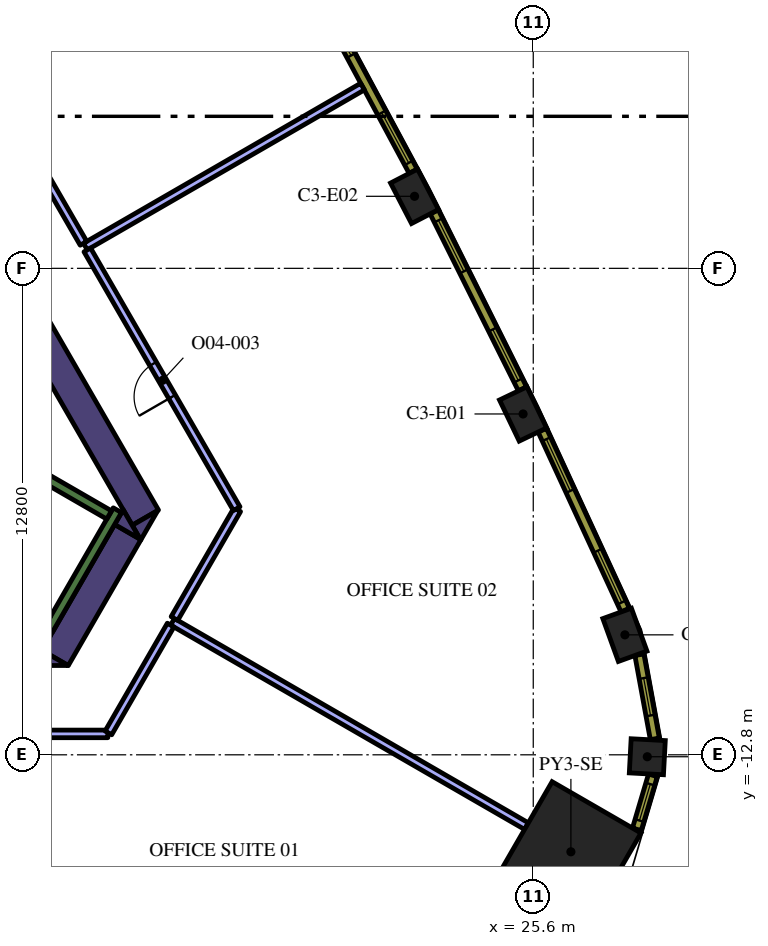
"""IFC4 building model, lengths in metres.
Left out: names, types, materials, properties, quantities, classifications, styles, units other than length and angle.
Written with IfcOpenShell. Run it as: python <this file> out.ifc"""

import sys

from ifc_helpers import new_model, si_unit, direction, frame, frame_2d, origin, origin_2d, place, context, subcontext, project, spatial, polyline, rectangle, outline, extrude, element, fill, save


model = new_model("IFC4")
c1 = context("Model", 3, precision=1e-05, world=origin(), true_north=direction((0.0, 1.0)))
c2 = subcontext(c1, "Body", "Model", "MODEL_VIEW")
j1 = project(units=[si_unit("LENGTHUNIT", "METRE"), si_unit("PLANEANGLEUNIT", "RADIAN")], contexts=[c1])
p1 = place(None, origin())
s1 = spatial("IfcSite", under=j1, at=p1, CompositionType="ELEMENT")
p2 = place(p1, origin())
s2 = spatial("IfcBuilding", under=s1, at=p2, CompositionType="ELEMENT")
p3 = place(p2, frame((0.0, 0.0, 183.6)))
s3 = spatial("IfcBuildingStorey", under=s2, at=p3, CompositionType="ELEMENT", Elevation=183.6)
p4 = place(p3, frame((26.591, -15.352, 0.0), z_axis=(0.0, 0.0, 1.0), x_axis=(0.866025403784, -0.5, 0.0)))
e1 = element("IfcColumn", 1, at=p4, inside=s3, PredefinedType="COLUMN", context=c2, shape_type="SweptSolid", body=[
    extrude(rectangle(XDim=2.7, YDim=2.7, at=origin_2d()), origin(), (0.0, 0.0, 1.0), 4.2),
])
p5 = place(p3, frame((28.601, -12.851, 0.0), z_axis=(0.0, 0.0, 1.0), x_axis=(0.0533921468, 0.998573622053, 0.0)))
e2 = element("IfcColumn", 2, at=p5, inside=s3, PredefinedType="COLUMN", context=c2, shape_type="SweptSolid", body=[
    extrude(rectangle(XDim=0.9, YDim=0.9, at=origin_2d()), origin(), (0.0, 0.0, 1.0), 4.2),
])
for number, where, z_axis, x_axis in (
    (3, (28.012, -9.644, 0.0), (0.0, 0.0, 1.0), (-0.341, 0.94, 0.0)),
    (4, (25.332, -3.832, 0.0), (0.0, 0.0, 1.0), (-0.433, 0.902, 0.0)),
    (5, (22.476, 1.896, 0.0), (0.0, 0.0, 1.0), (-0.46, 0.888, 0.0)),
):
    element("IfcColumn", number, at=place(p3, frame(where, z_axis=z_axis, x_axis=x_axis)), inside=s3, PredefinedType="COLUMN", context=c2, shape_type="SweptSolid", body=[
        extrude(rectangle(XDim=1.2, YDim=0.8, at=origin_2d()), origin(), (0.0, 0.0, 1.0), 4.2),
    ])
p6 = place(p3, frame((9.129, 4.289, 0.0), z_axis=(0.0, 0.0, 1.0), x_axis=(0.499995742806, -0.866027861663, 0.0)))
e6 = element("IfcWall", 6, at=p6, inside=s3, PredefinedType="SOLIDWALL", context=c2, shape_type="SweptSolid", body=[
    extrude(rectangle(XDim=12.527, YDim=0.8, at=frame_2d((6.264, 0.0))), origin(), (0.0, 0.0, 1.0), 4.2),
])
p7 = place(p3, origin())
e7 = element("IfcWall", 7, at=p7, inside=s3, PredefinedType="SOLIDWALL", context=c2, shape_type="SweptSolid", body=[
    extrude(outline(polyline([(15.271, -7.15), (15.047, -6.762), (15.719, -6.374), (15.271, -7.15)])), origin(), (0.0, 0.0, 1.0), 4.2),
])
p8 = place(p3, frame((13.018, -10.252, 0.0), z_axis=(0.0, 0.0, 1.0), x_axis=(0.499984020225, 0.866034629516, 0.0)))
e8 = element("IfcWall", 8, at=p8, inside=s3, PredefinedType="SOLIDWALL", context=c2, shape_type="SweptSolid", body=[
    extrude(rectangle(XDim=3.824, YDim=0.8, at=frame_2d((1.912, 0.0))), origin(), (0.0, 0.0, 1.0), 4.2),
])
e9 = element("IfcWall", 9, at=p7, inside=s3, PredefinedType="SOLIDWALL", context=c2, shape_type="SweptSolid", body=[
    extrude(outline(polyline([(12.671, -10.053), (13.358, -10.45), (12.442, -10.45), (12.671, -10.053)])), origin(), (0.0, 0.0, 1.0), 4.2),
])
e10 = element("IfcWall", 10, at=p7, inside=s3, PredefinedType="SOLIDWALL", context=c2, shape_type="SweptSolid", body=[
    extrude(outline(polyline([(14.809, -6.35), (15.257, -7.126), (14.585, -6.738), (14.809, -6.35)])), origin(), (0.0, 0.0, 1.0), 4.2),
])
p9 = place(p3, frame((12.84, -9.511, 0.0), z_axis=(0.0, 0.0, 1.0), x_axis=(0.499997733992, 0.866026712061, 0.0)))
e11 = element("IfcWall", 11, at=p9, inside=s3, PredefinedType="SOLIDWALL", context=c2, shape_type="SweptSolid", body=[
    extrude(rectangle(XDim=3.634, YDim=0.25, at=frame_2d((1.817, 0.0))), origin(), (0.0, 0.0, 1.0), 4.2),
])
p10 = place(p3, frame((8.334, -2.964, 0.0), z_axis=(0.0, 0.0, 1.0), x_axis=(0.866016039709, -0.500016218704, 0.0)))
e12 = element("IfcWall", 12, at=p10, inside=s3, PredefinedType="SOLIDWALL", context=c2, shape_type="SweptSolid", body=[
    extrude(rectangle(XDim=7.05, YDim=0.25, at=frame_2d((3.525, 0.0))), origin(), (0.0, 0.0, 1.0), 4.2),
])
p11 = place(p3, frame((16.108, -9.3, 0.0), z_axis=(0.0, 0.0, 1.0), x_axis=(0.866027180319, -0.499996922939, 0.0)))
e13 = element("IfcWall", 13, at=p11, inside=s3, PredefinedType="PARTITIONING", context=c2, shape_type="SweptSolid", body=[
    extrude(rectangle(XDim=10.754, YDim=0.2, at=frame_2d((5.377, 0.0))), origin(), (0.0, 0.0, 1.0), 3.15),
])
p12 = place(p3, frame((9.717, -12.25, 0.0), z_axis=(0.0, 0.0, 1.0), x_axis=(1.0, 0.0, 0.0)))
e14 = element("IfcWall", 14, at=p12, inside=s3, PredefinedType="PARTITIONING", context=c2, shape_type="SweptSolid", body=[
    extrude(rectangle(XDim=4.688, YDim=0.2, at=frame_2d((2.344, 0.0))), origin(), (0.0, 0.0, 1.0), 3.15),
])
p13 = place(p12, frame((1.8, 0.0, 0.0)))
e15 = element("IfcOpeningElement", 15, at=p13, cuts=e14, PredefinedType="OPENING", context=c2, shape_type="SweptSolid", body=[
    extrude(rectangle(XDim=1.0, YDim=2.1, at=frame_2d((0.5, 1.05))), frame((0.0, 0.11, 0.0), z_axis=(0.0, -1.0, 0.0), x_axis=(1.0, 0.0, 0.0)), (0.0, 0.0, 1.0), 0.22),
])
p14 = place(p3, frame((14.42, -12.224, 0.0), z_axis=(0.0, 0.0, 1.0), x_axis=(0.500001965626, 0.866024268927, 0.0)))
e16 = element("IfcWall", 16, at=p14, inside=s3, PredefinedType="PARTITIONING", context=c2, shape_type="SweptSolid", body=[
    extrude(rectangle(XDim=3.276, YDim=0.2, at=frame_2d((1.638, 0.0))), origin(), (0.0, 0.0, 1.0), 3.15),
])
p15 = place(p3, frame((13.815, 0.572, 0.0), z_axis=(0.0, 0.0, 1.0), x_axis=(0.866036391575, 0.499980968105, 0.0)))
e17 = element("IfcWall", 17, at=p15, inside=s3, PredefinedType="PARTITIONING", context=c2, shape_type="SweptSolid", body=[
    extrude(rectangle(XDim=8.42, YDim=0.2, at=frame_2d((4.21, 0.0))), origin(), (0.0, 0.0, 1.0), 3.15),
])
p16 = place(p3, frame((16.158, -9.213, 0.0), z_axis=(0.0, 0.0, 1.0), x_axis=(0.499990919662, 0.866030646256, 0.0)))
e18 = element("IfcWall", 18, at=p16, inside=s3, PredefinedType="PARTITIONING", context=c2, shape_type="SweptSolid", body=[
    extrude(rectangle(XDim=3.306, YDim=0.2, at=frame_2d((1.653, 0.0))), origin(), (0.0, 0.0, 1.0), 3.15),
])
p17 = place(p3, frame((17.796, -6.324, 0.0), z_axis=(0.0, 0.0, 1.0), x_axis=(-0.500026166427, 0.866010296064, 0.0)))
e19 = element("IfcWall", 19, at=p17, inside=s3, PredefinedType="PARTITIONING", context=c2, shape_type="SweptSolid", body=[
    extrude(rectangle(XDim=7.863, YDim=0.2, at=frame_2d((3.931, 0.0))), origin(), (0.0, 0.0, 1.0), 3.15),
])
p18 = place(p17, frame((3.4, 0.0, 0.0)))
e20 = element("IfcOpeningElement", 20, at=p18, cuts=e19, PredefinedType="OPENING", context=c2, shape_type="SweptSolid", body=[
    extrude(rectangle(XDim=1.0, YDim=2.1, at=frame_2d((0.5, 1.05))), frame((0.0, 0.11, 0.0), z_axis=(0.0, -1.0, 0.0), x_axis=(1.0, 0.0, 0.0)), (0.0, 0.0, 1.0), 0.22),
])
p19 = place(p3, frame((13.765, 0.659, 0.0), z_axis=(0.0, 0.0, 1.0), x_axis=(-0.500046568876, 0.865998515562, 0.0)))
e21 = element("IfcWall", 21, at=p19, inside=s3, PredefinedType="PARTITIONING", context=c2, shape_type="SweptSolid", body=[
    extrude(rectangle(XDim=2.782, YDim=0.2, at=frame_2d((1.391, 0.0))), origin(), (0.0, 0.0, 1.0), 3.15),
])
p20 = place(p3, frame((28.326, -14.76, 0.0), z_axis=(0.0, 0.0, 1.0), x_axis=(0.284413721403, 0.958701640281, 0.0)))
e22 = element("IfcWall", 22, at=p20, inside=s3, PredefinedType="SOLIDWALL", context=c2, shape_type="SweptSolid", body=[
    extrude(rectangle(XDim=1.482, YDim=0.24, at=frame_2d((0.741, 0.0))), origin(), (0.0, 0.0, 1.0), 3.95),
])
p21 = place(p20, frame((0.241, 0.0, 0.9)))
e23 = element("IfcOpeningElement", 23, at=p21, cuts=e22, PredefinedType="OPENING", context=c2, shape_type="SweptSolid", body=[
    extrude(rectangle(XDim=1.0, YDim=2.55, at=frame_2d((0.5, 1.275))), frame((0.0, 0.13, 0.0), z_axis=(0.0, -1.0, 0.0), x_axis=(1.0, 0.0, 0.0)), (0.0, 0.0, 1.0), 0.26),
])
p22 = place(p3, frame((28.799, -12.38, 0.0), z_axis=(0.0, 0.0, 1.0), x_axis=(-0.180737189259, 0.983531427265, 0.0)))
e24 = element("IfcWall", 24, at=p22, inside=s3, PredefinedType="SOLIDWALL", context=c2, shape_type="SweptSolid", body=[
    extrude(rectangle(XDim=2.25, YDim=0.24, at=frame_2d((1.125, 0.0))), origin(), (0.0, 0.0, 1.0), 3.95),
])
p23 = place(p22, frame((0.625, 0.0, 0.9)))
e25 = element("IfcOpeningElement", 25, at=p23, cuts=e24, PredefinedType="OPENING", context=c2, shape_type="SweptSolid", body=[
    extrude(rectangle(XDim=1.0, YDim=2.55, at=frame_2d((0.5, 1.275))), frame((0.0, 0.13, 0.0), z_axis=(0.0, -1.0, 0.0), x_axis=(1.0, 0.0, 0.0)), (0.0, 0.0, 1.0), 0.26),
])
p24 = place(p3, frame((28.02, -8.992, 0.0), z_axis=(0.0, 0.0, 1.0), x_axis=(-0.418722559465, 0.908114209885, 0.0)))
e26 = element("IfcWall", 26, at=p24, inside=s3, PredefinedType="SOLIDWALL", context=c2, shape_type="SweptSolid", body=[
    extrude(rectangle(XDim=5.213, YDim=0.24, at=frame_2d((2.606, 0.0))), origin(), (0.0, 0.0, 1.0), 3.95),
])
p25 = place(p24, frame((0.221, 0.0, 0.9)))
e27 = element("IfcOpeningElement", 27, at=p25, cuts=e26, PredefinedType="OPENING", context=c2, shape_type="SweptSolid", body=[
    extrude(rectangle(XDim=1.5, YDim=2.55, at=frame_2d((0.75, 1.275))), frame((0.0, 0.13, 0.0), z_axis=(0.0, -1.0, 0.0), x_axis=(1.0, 0.0, 0.0)), (0.0, 0.0, 1.0), 0.26),
])
p26 = place(p24, frame((3.452, 0.0, 0.9)))
e28 = element("IfcOpeningElement", 28, at=p26, cuts=e26, PredefinedType="OPENING", context=c2, shape_type="SweptSolid", body=[
    extrude(rectangle(XDim=1.5, YDim=2.55, at=frame_2d((0.75, 1.275))), frame((0.0, 0.13, 0.0), z_axis=(0.0, -1.0, 0.0), x_axis=(1.0, 0.0, 0.0)), (0.0, 0.0, 1.0), 0.26),
])
p27 = place(p3, frame((25.316, -3.171, 0.0), z_axis=(0.0, 0.0, 1.0), x_axis=(-0.446256171312, 0.8949052629, 0.0)))
e29 = element("IfcWall", 29, at=p27, inside=s3, PredefinedType="SOLIDWALL", context=c2, shape_type="SweptSolid", body=[
    extrude(rectangle(XDim=5.203, YDim=0.24, at=frame_2d((2.602, 0.0))), origin(), (0.0, 0.0, 1.0), 3.95),
])
p28 = place(p27, frame((0.248, 0.0, 0.9)))
e30 = element("IfcOpeningElement", 30, at=p28, cuts=e29, PredefinedType="OPENING", context=c2, shape_type="SweptSolid", body=[
    extrude(rectangle(XDim=1.5, YDim=2.55, at=frame_2d((0.75, 1.275))), frame((0.0, 0.13, 0.0), z_axis=(0.0, -1.0, 0.0), x_axis=(1.0, 0.0, 0.0)), (0.0, 0.0, 1.0), 0.26),
])
p29 = place(p27, frame((3.455, 0.0, 0.9)))
e31 = element("IfcOpeningElement", 31, at=p29, cuts=e29, PredefinedType="OPENING", context=c2, shape_type="SweptSolid", body=[
    extrude(rectangle(XDim=1.5, YDim=2.55, at=frame_2d((0.75, 1.275))), frame((0.0, 0.13, 0.0), z_axis=(0.0, -1.0, 0.0), x_axis=(1.0, 0.0, 0.0)), (0.0, 0.0, 1.0), 0.26),
])
p30 = place(p3, frame((22.44, 2.555, 0.0), z_axis=(0.0, 0.0, 1.0), x_axis=(-0.473349833294, 0.880874528704, 0.0)))
e32 = element("IfcWall", 32, at=p30, inside=s3, PredefinedType="SOLIDWALL", context=c2, shape_type="SweptSolid", body=[
    extrude(rectangle(XDim=5.204, YDim=0.24, at=frame_2d((2.602, 0.0))), origin(), (0.0, 0.0, 1.0), 3.95),
])
p31 = place(p30, frame((0.248, 0.0, 0.9)))
e33 = element("IfcOpeningElement", 33, at=p31, cuts=e32, PredefinedType="OPENING", context=c2, shape_type="SweptSolid", body=[
    extrude(rectangle(XDim=1.5, YDim=2.55, at=frame_2d((0.75, 1.275))), frame((0.0, 0.13, 0.0), z_axis=(0.0, -1.0, 0.0), x_axis=(1.0, 0.0, 0.0)), (0.0, 0.0, 1.0), 0.26),
])
p32 = place(p30, frame((3.455, 0.0, 0.9)))
e34 = element("IfcOpeningElement", 34, at=p32, cuts=e32, PredefinedType="OPENING", context=c2, shape_type="SweptSolid", body=[
    extrude(rectangle(XDim=1.5, YDim=2.55, at=frame_2d((0.75, 1.275))), frame((0.0, 0.13, 0.0), z_axis=(0.0, -1.0, 0.0), x_axis=(1.0, 0.0, 0.0)), (0.0, 0.0, 1.0), 0.26),
])
p33 = place(p18, origin())
e35 = element("IfcDoor", 35, at=p33, inside=s3, OperationType="SINGLE_SWING_LEFT", PredefinedType="DOOR", context=c2, shape_type="SweptSolid", body=[
    extrude(rectangle(XDim=1.0, YDim=2.1, at=frame_2d((0.5, 1.05))), frame((0.0, 0.025, 0.0), z_axis=(0.0, -1.0, 0.0), x_axis=(1.0, 0.0, 0.0)), (0.0, 0.0, 1.0), 0.05),
])
fill(e20, e35)
p34 = place(p21, origin())
e36 = element("IfcWindow", 36, at=p34, inside=s3, PartitioningType="SINGLE_PANEL", PredefinedType="WINDOW", context=c2, shape_type="SweptSolid", body=[
    extrude(rectangle(XDim=1.0, YDim=2.55, at=frame_2d((0.5, 1.275))), frame((0.0, 0.04, 0.0), z_axis=(0.0, -1.0, 0.0), x_axis=(1.0, 0.0, 0.0)), (0.0, 0.0, 1.0), 0.06),
])
fill(e23, e36)
p35 = place(p23, origin())
e37 = element("IfcWindow", 37, at=p35, inside=s3, PartitioningType="SINGLE_PANEL", PredefinedType="WINDOW", context=c2, shape_type="SweptSolid", body=[
    extrude(rectangle(XDim=1.0, YDim=2.55, at=frame_2d((0.5, 1.275))), frame((0.0, 0.04, 0.0), z_axis=(0.0, -1.0, 0.0), x_axis=(1.0, 0.0, 0.0)), (0.0, 0.0, 1.0), 0.06),
])
fill(e25, e37)
p36 = place(p25, origin())
e38 = element("IfcWindow", 38, at=p36, inside=s3, PartitioningType="SINGLE_PANEL", PredefinedType="WINDOW", context=c2, shape_type="SweptSolid", body=[
    extrude(rectangle(XDim=1.5, YDim=2.55, at=frame_2d((0.75, 1.275))), frame((0.0, 0.04, 0.0), z_axis=(0.0, -1.0, 0.0), x_axis=(1.0, 0.0, 0.0)), (0.0, 0.0, 1.0), 0.06),
])
fill(e27, e38)
p37 = place(p26, origin())
e39 = element("IfcWindow", 39, at=p37, inside=s3, PartitioningType="SINGLE_PANEL", PredefinedType="WINDOW", context=c2, shape_type="SweptSolid", body=[
    extrude(rectangle(XDim=1.5, YDim=2.55, at=frame_2d((0.75, 1.275))), frame((0.0, 0.04, 0.0), z_axis=(0.0, -1.0, 0.0), x_axis=(1.0, 0.0, 0.0)), (0.0, 0.0, 1.0), 0.06),
])
fill(e28, e39)
p38 = place(p28, origin())
e40 = element("IfcWindow", 40, at=p38, inside=s3, PartitioningType="SINGLE_PANEL", PredefinedType="WINDOW", context=c2, shape_type="SweptSolid", body=[
    extrude(rectangle(XDim=1.5, YDim=2.55, at=frame_2d((0.75, 1.275))), frame((0.0, 0.04, 0.0), z_axis=(0.0, -1.0, 0.0), x_axis=(1.0, 0.0, 0.0)), (0.0, 0.0, 1.0), 0.06),
])
fill(e30, e40)
p39 = place(p29, origin())
e41 = element("IfcWindow", 41, at=p39, inside=s3, PartitioningType="SINGLE_PANEL", PredefinedType="WINDOW", context=c2, shape_type="SweptSolid", body=[
    extrude(rectangle(XDim=1.5, YDim=2.55, at=frame_2d((0.75, 1.275))), frame((0.0, 0.04, 0.0), z_axis=(0.0, -1.0, 0.0), x_axis=(1.0, 0.0, 0.0)), (0.0, 0.0, 1.0), 0.06),
])
fill(e31, e41)
p40 = place(p31, origin())
e42 = element("IfcWindow", 42, at=p40, inside=s3, PartitioningType="SINGLE_PANEL", PredefinedType="WINDOW", context=c2, shape_type="SweptSolid", body=[
    extrude(rectangle(XDim=1.5, YDim=2.55, at=frame_2d((0.75, 1.275))), frame((0.0, 0.04, 0.0), z_axis=(0.0, -1.0, 0.0), x_axis=(1.0, 0.0, 0.0)), (0.0, 0.0, 1.0), 0.06),
])
fill(e33, e42)
p41 = place(p32, origin())
e43 = element("IfcWindow", 43, at=p41, inside=s3, PartitioningType="SINGLE_PANEL", PredefinedType="WINDOW", context=c2, shape_type="SweptSolid", body=[
    extrude(rectangle(XDim=1.5, YDim=2.55, at=frame_2d((0.75, 1.275))), frame((0.0, 0.04, 0.0), z_axis=(0.0, -1.0, 0.0), x_axis=(1.0, 0.0, 0.0)), (0.0, 0.0, 1.0), 0.06),
])
fill(e34, e43)
save(model, sys.argv[1])
